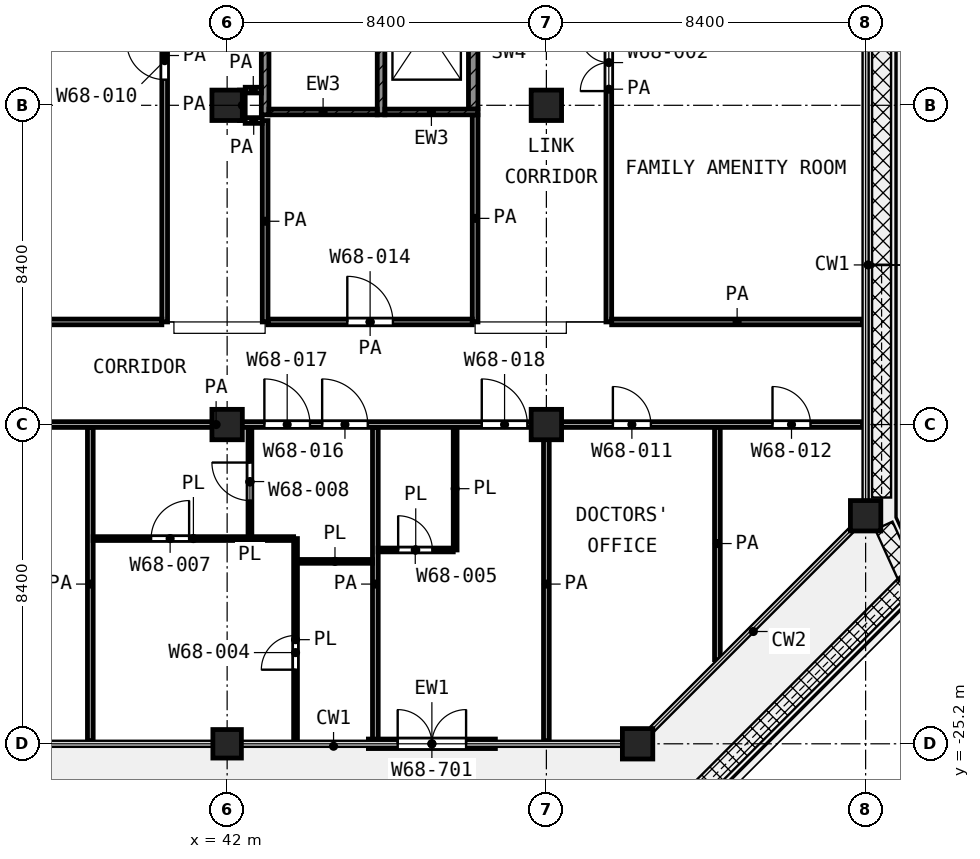
"""IFC4 building model, lengths in metres.
Left out: names, types, materials, properties, quantities, classifications, styles, units other than length and angle.
Written with IfcOpenShell. Run it as: python <this file> out.ifc"""

import sys

from ifc_helpers import new_model, si_unit, direction, frame, frame_2d, origin, origin_2d, place, context, subcontext, project, spatial, rectangle, extrude, element, fill, save


model = new_model("IFC4")
c1 = context("Model", 3, precision=1e-05, world=origin(), true_north=direction((0.0, 1.0)))
c2 = subcontext(c1, "Body", "Model", "MODEL_VIEW")
j1 = project(units=[si_unit("LENGTHUNIT", "METRE"), si_unit("PLANEANGLEUNIT", "RADIAN")], contexts=[c1])
p1 = place(None, origin())
s1 = spatial("IfcSite", under=j1, at=p1, CompositionType="ELEMENT")
p2 = place(p1, origin())
s2 = spatial("IfcBuilding", under=s1, at=p2, CompositionType="ELEMENT")
p3 = place(p2, frame((0.0, 0.0, 315.4)))
s3 = spatial("IfcBuildingStorey", under=s2, at=p3, CompositionType="ELEMENT", Elevation=315.4)
for number, where, z_axis, x_axis in (
    (1, (42.0, -8.4, 0.0), (0.0, 0.0, 1.0), (1.0, 0.0, 0.0)),
    (2, (50.4, -8.4, 0.0), (0.0, 0.0, 1.0), (1.0, 0.0, 0.0)),
    (3, (42.0, -16.8, 0.0), (0.0, 0.0, 1.0), (1.0, 0.0, 0.0)),
    (4, (50.4, -16.8, 0.0), (0.0, 0.0, 1.0), (1.0, 0.0, 0.0)),
    (5, (58.8, -19.2, 0.0), (0.0, 0.0, 1.0), (1.0, 0.0, 0.0)),
):
    element("IfcColumn", number, at=place(p3, frame(where, z_axis=z_axis, x_axis=x_axis)), inside=s3, PredefinedType="COLUMN", context=c2, shape_type="SweptSolid", body=[
        extrude(rectangle(XDim=0.8, YDim=0.8, at=origin_2d()), origin(), (0.0, 0.0, 1.0), 4.2),
    ])
p4 = place(p3, frame((42.0, -25.2, 0.0), z_axis=(0.0, 0.0, 1.0), x_axis=(1.0, 0.0, 0.0)))
e6 = element("IfcColumn", 6, at=p4, inside=s3, PredefinedType="COLUMN", context=c2, shape_type="SweptSolid", body=[
    extrude(rectangle(XDim=0.75, YDim=0.75, at=origin_2d()), origin(), (0.0, 0.0, 1.0), 4.2),
])
p5 = place(p3, frame((52.8, -25.2, 0.0), z_axis=(0.0, 0.0, 1.0), x_axis=(1.0, 0.0, 0.0)))
e7 = element("IfcColumn", 7, at=p5, inside=s3, PredefinedType="COLUMN", context=c2, shape_type="SweptSolid", body=[
    extrude(rectangle(XDim=0.8, YDim=0.8, at=origin_2d()), origin(), (0.0, 0.0, 1.0), 4.2),
])
p6 = place(p3, frame((45.717, -25.2, 0.0), z_axis=(0.0, 0.0, 1.0), x_axis=(1.0, 0.0, 0.0)))
e8 = element("IfcWall", 8, at=p6, inside=s3, PredefinedType="SOLIDWALL", context=c2, shape_type="SweptSolid", body=[
    extrude(rectangle(XDim=3.342, YDim=0.25, at=frame_2d((1.671, 0.0))), origin(), (0.0, 0.0, 1.0), 3.48),
])
p7 = place(p6, frame((0.771, 0.0, 0.0)))
e9 = element("IfcOpeningElement", 9, at=p7, cuts=e8, PredefinedType="OPENING", context=c2, shape_type="SweptSolid", body=[
    extrude(rectangle(XDim=1.8, YDim=2.1, at=frame_2d((0.9, 1.05))), frame((0.0, 0.135, 0.0), z_axis=(0.0, -1.0, 0.0), x_axis=(1.0, 0.0, 0.0)), (0.0, 0.0, 1.0), 0.27),
])
p8 = place(p3, frame((43.0, -8.65, 0.0), z_axis=(0.0, 0.0, 1.0), x_axis=(0.0, 1.0, 0.0)))
e10 = element("IfcWall", 10, at=p8, inside=s3, PredefinedType="SHEAR", context=c2, shape_type="SweptSolid", body=[
    extrude(rectangle(XDim=8.35, YDim=0.2, at=frame_2d((4.175, 0.0))), origin(), (0.0, 0.0, 1.0), 3.6),
])
p9 = place(p8, frame((7.0, 0.0, 0.0)))
e11 = element("IfcOpeningElement", 11, at=p9, cuts=e10, PredefinedType="OPENING", context=c2, shape_type="SweptSolid", body=[
    extrude(rectangle(XDim=1.1, YDim=2.1, at=frame_2d((0.55, 1.05))), frame((0.0, 0.11, 0.0), z_axis=(0.0, -1.0, 0.0), x_axis=(1.0, 0.0, 0.0)), (0.0, 0.0, 1.0), 0.22),
])
p10 = place(p3, frame((46.05, -8.65, 0.0), z_axis=(0.0, 0.0, 1.0), x_axis=(0.0, 1.0, 0.0)))
e12 = element("IfcWall", 12, at=p10, inside=s3, PredefinedType="SHEAR", context=c2, shape_type="SweptSolid", body=[
    extrude(rectangle(XDim=8.35, YDim=0.2, at=frame_2d((4.175, 0.0))), origin(), (0.0, 0.0, 1.0), 3.6),
])
p11 = place(p10, frame((7.0, 0.0, 0.0)))
e13 = element("IfcOpeningElement", 13, at=p11, cuts=e12, PredefinedType="OPENING", context=c2, shape_type="SweptSolid", body=[
    extrude(rectangle(XDim=1.1, YDim=2.1, at=frame_2d((0.55, 1.05))), frame((0.0, 0.11, 0.0), z_axis=(0.0, -1.0, 0.0), x_axis=(1.0, 0.0, 0.0)), (0.0, 0.0, 1.0), 0.22),
])
p12 = place(p3, frame((43.1, -8.575, 0.0), z_axis=(0.0, 0.0, 1.0), x_axis=(1.0, 0.0, 0.0)))
e14 = element("IfcWall", 14, at=p12, inside=s3, PredefinedType="SHEAR", context=c2, shape_type="SweptSolid", body=[
    extrude(rectangle(XDim=2.85, YDim=0.15, at=frame_2d((1.425, 0.0))), origin(), (0.0, 0.0, 1.0), 3.6),
])
p13 = place(p3, frame((46.15, -8.575, 0.0), z_axis=(0.0, 0.0, 1.0), x_axis=(1.0, 0.0, 0.0)))
e15 = element("IfcWall", 15, at=p13, inside=s3, PredefinedType="SHEAR", context=c2, shape_type="SweptSolid", body=[
    extrude(rectangle(XDim=2.45, YDim=0.15, at=frame_2d((1.225, 0.0))), origin(), (0.0, 0.0, 1.0), 3.6),
])
p14 = place(p3, frame((48.475, -8.5, 0.0), z_axis=(0.0, 0.0, 1.0), x_axis=(0.0, 1.0, 0.0)))
e16 = element("IfcWall", 16, at=p14, inside=s3, PredefinedType="SHEAR", context=c2, shape_type="SweptSolid", body=[
    extrude(rectangle(XDim=3.475, YDim=0.25, at=frame_2d((1.738, 0.0))), origin(), (0.0, 0.0, 1.0), 3.6),
])
p15 = place(p3, frame((43.85, -20.4, 0.0), z_axis=(0.0, 0.0, 1.0), x_axis=(1.0, 0.0, 0.0)))
e17 = element("IfcWall", 17, at=p15, inside=s3, PredefinedType="PARTITIONING", context=c2, shape_type="SweptSolid", body=[
    extrude(rectangle(XDim=1.975, YDim=0.1, at=frame_2d((0.987, 0.0))), origin(), (0.0, 0.0, 1.0), 3.6),
])
p16 = place(p3, frame((45.975, -20.1, 0.0), z_axis=(0.0, 0.0, 1.0), x_axis=(1.0, 0.0, 0.0)))
e18 = element("IfcWall", 18, at=p16, inside=s3, PredefinedType="PARTITIONING", context=c2, shape_type="SweptSolid", body=[
    extrude(rectangle(XDim=1.975, YDim=0.1, at=frame_2d((0.987, 0.0))), origin(), (0.0, 0.0, 1.0), 3.6),
])
p17 = place(p16, frame((0.525, 0.0, 0.0)))
e19 = element("IfcOpeningElement", 19, at=p17, cuts=e18, PredefinedType="OPENING", context=c2, shape_type="SweptSolid", body=[
    extrude(rectangle(XDim=0.9, YDim=2.1, at=frame_2d((0.45, 1.05))), frame((0.0, 0.06, 0.0), z_axis=(0.0, -1.0, 0.0), x_axis=(1.0, 0.0, 0.0)), (0.0, 0.0, 1.0), 0.12),
])
p18 = place(p3, frame((38.475, -19.8, 0.0), z_axis=(0.0, 0.0, 1.0), x_axis=(1.0, 0.0, 0.0)))
e20 = element("IfcWall", 20, at=p18, inside=s3, PredefinedType="PARTITIONING", context=c2, shape_type="SweptSolid", body=[
    extrude(rectangle(XDim=5.275, YDim=0.1, at=frame_2d((2.637, 0.0))), origin(), (0.0, 0.0, 1.0), 3.6),
])
p19 = place(p18, frame((1.525, 0.0, 0.0)))
e21 = element("IfcOpeningElement", 21, at=p19, cuts=e20, PredefinedType="OPENING", context=c2, shape_type="SweptSolid", body=[
    extrude(rectangle(XDim=1.0, YDim=2.1, at=frame_2d((0.5, 1.05))), frame((0.0, 0.06, 0.0), z_axis=(0.0, -1.0, 0.0), x_axis=(1.0, 0.0, 0.0)), (0.0, 0.0, 1.0), 0.12),
])
p20 = place(p3, frame((42.6, -19.75, 0.0), z_axis=(0.0, 0.0, 1.0), x_axis=(0.0, 1.0, 0.0)))
e22 = element("IfcWall", 22, at=p20, inside=s3, PredefinedType="PARTITIONING", context=c2, shape_type="SweptSolid", body=[
    extrude(rectangle(XDim=2.875, YDim=0.1, at=frame_2d((1.438, 0.0))), origin(), (0.0, 0.0, 1.0), 3.6),
])
p21 = place(p20, frame((0.95, 0.0, 0.0)))
e23 = element("IfcOpeningElement", 23, at=p21, cuts=e22, PredefinedType="OPENING", context=c2, shape_type="SweptSolid", body=[
    extrude(rectangle(XDim=1.0, YDim=2.1, at=frame_2d((0.5, 1.05))), frame((0.0, 0.06, 0.0), z_axis=(0.0, -1.0, 0.0), x_axis=(1.0, 0.0, 0.0)), (0.0, 0.0, 1.0), 0.12),
])
p22 = place(p3, frame((43.8, -25.12, 0.0), z_axis=(0.0, 0.0, 1.0), x_axis=(0.0, 1.0, 0.0)))
e24 = element("IfcWall", 24, at=p22, inside=s3, PredefinedType="PARTITIONING", context=c2, shape_type="SweptSolid", body=[
    extrude(rectangle(XDim=5.32, YDim=0.1, at=frame_2d((2.66, 0.0))), origin(), (0.0, 0.0, 1.0), 3.6),
])
p23 = place(p22, frame((1.87, 0.0, 0.0)))
e25 = element("IfcOpeningElement", 25, at=p23, cuts=e24, PredefinedType="OPENING", context=c2, shape_type="SweptSolid", body=[
    extrude(rectangle(XDim=0.9, YDim=2.1, at=frame_2d((0.45, 1.05))), frame((0.0, 0.06, 0.0), z_axis=(0.0, -1.0, 0.0), x_axis=(1.0, 0.0, 0.0)), (0.0, 0.0, 1.0), 0.12),
])
p24 = place(p3, frame((48.0, -20.1, 0.0), z_axis=(0.0, 0.0, 1.0), x_axis=(0.0, 1.0, 0.0)))
e26 = element("IfcWall", 26, at=p24, inside=s3, PredefinedType="PARTITIONING", context=c2, shape_type="SweptSolid", body=[
    extrude(rectangle(XDim=3.225, YDim=0.1, at=frame_2d((1.613, 0.0))), origin(), (0.0, 0.0, 1.0), 3.6),
])
p25 = place(p3, frame((24.7, -16.8, 0.0), z_axis=(0.0, 0.0, 1.0), x_axis=(1.0, 0.0, 0.0)))
e27 = element("IfcWall", 27, at=p25, inside=s3, PredefinedType="PARTITIONING", context=c2, shape_type="SweptSolid", body=[
    extrude(rectangle(XDim=34.02, YDim=0.15, at=frame_2d((17.01, 0.0))), origin(), (0.0, 0.0, 1.0), 3.6),
])
p26 = place(p25, frame((1.85, 0.0, 0.0)))
e28 = element("IfcOpeningElement", 28, at=p26, cuts=e27, PredefinedType="OPENING", context=c2, shape_type="SweptSolid", body=[
    extrude(rectangle(XDim=1.5, YDim=2.1, at=frame_2d((0.75, 1.05))), frame((0.0, 0.085, 0.0), z_axis=(0.0, -1.0, 0.0), x_axis=(1.0, 0.0, 0.0)), (0.0, 0.0, 1.0), 0.17),
])
p27 = place(p25, frame((9.4, 0.0, 0.0)))
e29 = element("IfcOpeningElement", 29, at=p27, cuts=e27, PredefinedType="OPENING", context=c2, shape_type="SweptSolid", body=[
    extrude(rectangle(XDim=1.2, YDim=2.1, at=frame_2d((0.6, 1.05))), frame((0.0, 0.085, 0.0), z_axis=(0.0, -1.0, 0.0), x_axis=(1.0, 0.0, 0.0)), (0.0, 0.0, 1.0), 0.17),
])
p28 = place(p25, frame((19.8, 0.0, 0.0)))
e30 = element("IfcOpeningElement", 30, at=p28, cuts=e27, PredefinedType="OPENING", context=c2, shape_type="SweptSolid", body=[
    extrude(rectangle(XDim=1.2, YDim=2.1, at=frame_2d((0.6, 1.05))), frame((0.0, 0.085, 0.0), z_axis=(0.0, -1.0, 0.0), x_axis=(1.0, 0.0, 0.0)), (0.0, 0.0, 1.0), 0.17),
])
p29 = place(p25, frame((18.28, 0.0, 0.0)))
e31 = element("IfcOpeningElement", 31, at=p29, cuts=e27, PredefinedType="OPENING", context=c2, shape_type="SweptSolid", body=[
    extrude(rectangle(XDim=1.2, YDim=2.1, at=frame_2d((0.6, 1.05))), frame((0.0, 0.085, 0.0), z_axis=(0.0, -1.0, 0.0), x_axis=(1.0, 0.0, 0.0)), (0.0, 0.0, 1.0), 0.17),
])
p30 = place(p25, frame((24.0, 0.0, 0.0)))
e32 = element("IfcOpeningElement", 32, at=p30, cuts=e27, PredefinedType="OPENING", context=c2, shape_type="SweptSolid", body=[
    extrude(rectangle(XDim=1.2, YDim=2.1, at=frame_2d((0.6, 1.05))), frame((0.0, 0.085, 0.0), z_axis=(0.0, -1.0, 0.0), x_axis=(1.0, 0.0, 0.0)), (0.0, 0.0, 1.0), 0.17),
])
p31 = place(p25, frame((27.45, 0.0, 0.0)))
e33 = element("IfcOpeningElement", 33, at=p31, cuts=e27, PredefinedType="OPENING", context=c2, shape_type="SweptSolid", body=[
    extrude(rectangle(XDim=1.0, YDim=2.1, at=frame_2d((0.5, 1.05))), frame((0.0, 0.085, 0.0), z_axis=(0.0, -1.0, 0.0), x_axis=(1.0, 0.0, 0.0)), (0.0, 0.0, 1.0), 0.17),
])
p32 = place(p25, frame((31.65, 0.0, 0.0)))
e34 = element("IfcOpeningElement", 34, at=p32, cuts=e27, PredefinedType="OPENING", context=c2, shape_type="SweptSolid", body=[
    extrude(rectangle(XDim=1.0, YDim=2.1, at=frame_2d((0.5, 1.05))), frame((0.0, 0.085, 0.0), z_axis=(0.0, -1.0, 0.0), x_axis=(1.0, 0.0, 0.0)), (0.0, 0.0, 1.0), 0.17),
])
p33 = place(p3, frame((29.475, -14.1, 0.0), z_axis=(0.0, 0.0, 1.0), x_axis=(1.0, 0.0, 0.0)))
e35 = element("IfcWall", 35, at=p33, inside=s3, PredefinedType="PARTITIONING", context=c2, shape_type="SweptSolid", body=[
    extrude(rectangle(XDim=10.807, YDim=0.15, at=frame_2d((5.403, 0.0))), origin(), (0.0, 0.0, 1.0), 3.6),
])
p34 = place(p33, frame((1.425, 0.0, 0.0)))
e36 = element("IfcOpeningElement", 36, at=p34, cuts=e35, PredefinedType="OPENING", context=c2, shape_type="SweptSolid", body=[
    extrude(rectangle(XDim=1.2, YDim=2.1, at=frame_2d((0.6, 1.05))), frame((0.0, 0.085, 0.0), z_axis=(0.0, -1.0, 0.0), x_axis=(1.0, 0.0, 0.0)), (0.0, 0.0, 1.0), 0.17),
])
p35 = place(p3, frame((43.075, -14.1, 0.0), z_axis=(0.0, 0.0, 1.0), x_axis=(1.0, 0.0, 0.0)))
e37 = element("IfcWall", 37, at=p35, inside=s3, PredefinedType="PARTITIONING", context=c2, shape_type="SweptSolid", body=[
    extrude(rectangle(XDim=5.375, YDim=0.15, at=frame_2d((2.688, 0.0))), origin(), (0.0, 0.0, 1.0), 3.6),
])
p36 = place(p35, frame((2.087, 0.0, 0.0)))
e38 = element("IfcOpeningElement", 38, at=p36, cuts=e37, PredefinedType="OPENING", context=c2, shape_type="SweptSolid", body=[
    extrude(rectangle(XDim=1.2, YDim=2.1, at=frame_2d((0.6, 1.05))), frame((0.0, 0.085, 0.0), z_axis=(0.0, -1.0, 0.0), x_axis=(1.0, 0.0, 0.0)), (0.0, 0.0, 1.0), 0.17),
])
p37 = place(p3, frame((52.118, -14.1, 0.0), z_axis=(0.0, 0.0, 1.0), x_axis=(1.0, 0.0, 0.0)))
e39 = element("IfcWall", 39, at=p37, inside=s3, PredefinedType="PARTITIONING", context=c2, shape_type="SweptSolid", body=[
    extrude(rectangle(XDim=6.602, YDim=0.15, at=frame_2d((3.301, 0.0))), origin(), (0.0, 0.0, 1.0), 3.6),
])
p38 = place(p3, frame((42.475, -8.8, 0.0), z_axis=(0.0, 0.0, 1.0), x_axis=(1.0, 0.0, 0.0)))
e40 = element("IfcWall", 40, at=p38, inside=s3, PredefinedType="PARTITIONING", context=c2, shape_type="SweptSolid", body=[
    extrude(rectangle(XDim=0.448, YDim=0.15, at=frame_2d((0.224, 0.0))), origin(), (0.0, 0.0, 1.0), 3.6),
])
p39 = place(p3, frame((42.476, -8.0, 0.0), z_axis=(0.0, 0.0, 1.0), x_axis=(1.0, 0.0, 0.0)))
e41 = element("IfcWall", 41, at=p39, inside=s3, PredefinedType="PARTITIONING", context=c2, shape_type="SweptSolid", body=[
    extrude(rectangle(XDim=0.424, YDim=0.15, at=frame_2d((0.212, 0.0))), origin(), (0.0, 0.0, 1.0), 3.6),
])
p40 = place(p3, frame((38.4, -25.12, 0.0), z_axis=(0.0, 0.0, 1.0), x_axis=(0.0, 1.0, 0.0)))
e42 = element("IfcWall", 42, at=p40, inside=s3, PredefinedType="PARTITIONING", context=c2, shape_type="SweptSolid", body=[
    extrude(rectangle(XDim=8.245, YDim=0.15, at=frame_2d((4.123, 0.0))), origin(), (0.0, 0.0, 1.0), 3.6),
])
p41 = place(p3, frame((40.357, -14.1, 0.0), z_axis=(0.0, 0.0, 1.0), x_axis=(0.0, 1.0, 0.0)))
e43 = element("IfcWall", 43, at=p41, inside=s3, PredefinedType="PARTITIONING", context=c2, shape_type="SweptSolid", body=[
    extrude(rectangle(XDim=14.02, YDim=0.15, at=frame_2d((7.01, 0.0))), origin(), (0.0, 0.0, 1.0), 3.6),
])
p42 = place(p41, frame((6.375, 0.0, 0.0)))
e44 = element("IfcOpeningElement", 44, at=p42, cuts=e43, PredefinedType="OPENING", context=c2, shape_type="SweptSolid", body=[
    extrude(rectangle(XDim=1.0, YDim=2.1, at=frame_2d((0.5, 1.05))), frame((0.0, 0.085, 0.0), z_axis=(0.0, -1.0, 0.0), x_axis=(1.0, 0.0, 0.0)), (0.0, 0.0, 1.0), 0.17),
])
p43 = place(p3, frame((42.4, -8.8, 0.0), z_axis=(0.0, 0.0, 1.0), x_axis=(0.0, 1.0, 0.0)))
e45 = element("IfcWall", 45, at=p43, inside=s3, PredefinedType="PARTITIONING", context=c2, shape_type="SweptSolid", body=[
    extrude(rectangle(XDim=0.799, YDim=0.15, at=frame_2d((0.399, 0.0))), origin(), (0.0, 0.0, 1.0), 3.6),
])
p44 = place(p3, frame((43.0, -14.1, 0.0), z_axis=(0.0, 0.0, 1.0), x_axis=(0.0, 1.0, 0.0)))
e46 = element("IfcWall", 46, at=p44, inside=s3, PredefinedType="PARTITIONING", context=c2, shape_type="SweptSolid", body=[
    extrude(rectangle(XDim=5.298, YDim=0.15, at=frame_2d((2.649, 0.0))), origin(), (0.0, 0.0, 1.0), 3.6),
])
p45 = place(p3, frame((45.9, -25.12, 0.0), z_axis=(0.0, 0.0, 1.0), x_axis=(0.0, 1.0, 0.0)))
e47 = element("IfcWall", 47, at=p45, inside=s3, PredefinedType="PARTITIONING", context=c2, shape_type="SweptSolid", body=[
    extrude(rectangle(XDim=8.245, YDim=0.15, at=frame_2d((4.123, 0.0))), origin(), (0.0, 0.0, 1.0), 3.6),
])
p46 = place(p3, frame((48.525, -14.1, 0.0), z_axis=(0.0, 0.0, 1.0), x_axis=(0.0, 1.0, 0.0)))
e48 = element("IfcWall", 48, at=p46, inside=s3, PredefinedType="PARTITIONING", context=c2, shape_type="SweptSolid", body=[
    extrude(rectangle(XDim=5.45, YDim=0.15, at=frame_2d((2.725, 0.0))), origin(), (0.0, 0.0, 1.0), 3.6),
])
p47 = place(p3, frame((50.4, -25.12, 0.0), z_axis=(0.0, 0.0, 1.0), x_axis=(0.0, 1.0, 0.0)))
e49 = element("IfcWall", 49, at=p47, inside=s3, PredefinedType="PARTITIONING", context=c2, shape_type="SweptSolid", body=[
    extrude(rectangle(XDim=8.245, YDim=0.15, at=frame_2d((4.123, 0.0))), origin(), (0.0, 0.0, 1.0), 3.6),
])
p48 = place(p3, frame((52.043, -14.1, 0.0), z_axis=(0.0, 0.0, 1.0), x_axis=(0.0, 1.0, 0.0)))
e50 = element("IfcWall", 50, at=p48, inside=s3, PredefinedType="PARTITIONING", context=c2, shape_type="SweptSolid", body=[
    extrude(rectangle(XDim=12.248, YDim=0.15, at=frame_2d((6.124, 0.0))), origin(), (0.0, 0.0, 1.0), 3.6),
])
p49 = place(p48, frame((6.074, 0.0, 0.0)))
e51 = element("IfcOpeningElement", 51, at=p49, cuts=e50, PredefinedType="OPENING", context=c2, shape_type="SweptSolid", body=[
    extrude(rectangle(XDim=1.5, YDim=2.1, at=frame_2d((0.75, 1.05))), frame((0.0, 0.085, 0.0), z_axis=(0.0, -1.0, 0.0), x_axis=(1.0, 0.0, 0.0)), (0.0, 0.0, 1.0), 0.17),
])
p50 = place(p3, frame((54.9, -22.987, 0.0), z_axis=(0.0, 0.0, 1.0), x_axis=(0.0, 1.0, 0.0)))
e52 = element("IfcWall", 52, at=p50, inside=s3, PredefinedType="PARTITIONING", context=c2, shape_type="SweptSolid", body=[
    extrude(rectangle(XDim=6.112, YDim=0.15, at=frame_2d((3.056, 0.0))), origin(), (0.0, 0.0, 1.0), 3.6),
])
p51 = place(p7, origin())
e53 = element("IfcDoor", 53, at=p51, inside=s3, OperationType="DOUBLE_DOOR_SINGLE_SWING", PredefinedType="DOOR", context=c2, shape_type="SweptSolid", body=[
    extrude(rectangle(XDim=1.8, YDim=2.1, at=frame_2d((0.9, 1.05))), frame((0.0, 0.025, 0.0), z_axis=(0.0, -1.0, 0.0), x_axis=(1.0, 0.0, 0.0)), (0.0, 0.0, 1.0), 0.05),
])
fill(e9, e53)
p52 = place(p42, origin())
e54 = element("IfcDoor", 54, at=p52, inside=s3, OperationType="SINGLE_SWING_RIGHT", PredefinedType="DOOR", context=c2, shape_type="SweptSolid", body=[
    extrude(rectangle(XDim=1.0, YDim=2.1, at=frame_2d((0.5, 1.05))), frame((0.0, 0.025, 0.0), z_axis=(0.0, -1.0, 0.0), x_axis=(1.0, 0.0, 0.0)), (0.0, 0.0, 1.0), 0.05),
])
fill(e44, e54)
p53 = place(p36, origin())
e55 = element("IfcDoor", 55, at=p53, inside=s3, OperationType="SINGLE_SWING_LEFT", PredefinedType="DOOR", context=c2, shape_type="SweptSolid", body=[
    extrude(rectangle(XDim=1.2, YDim=2.1, at=frame_2d((0.6, 1.05))), frame((0.0, 0.025, 0.0), z_axis=(0.0, -1.0, 0.0), x_axis=(1.0, 0.0, 0.0)), (0.0, 0.0, 1.0), 0.05),
])
fill(e38, e55)
p54 = place(p49, origin())
e56 = element("IfcDoor", 56, at=p54, inside=s3, OperationType="DOUBLE_DOOR_SINGLE_SWING", PredefinedType="DOOR", context=c2, shape_type="SweptSolid", body=[
    extrude(rectangle(XDim=1.5, YDim=2.1, at=frame_2d((0.75, 1.05))), frame((0.0, 0.025, 0.0), z_axis=(0.0, -1.0, 0.0), x_axis=(1.0, 0.0, 0.0)), (0.0, 0.0, 1.0), 0.05),
])
fill(e51, e56)
p55 = place(p28, origin())
e57 = element("IfcDoor", 57, at=p55, inside=s3, OperationType="SINGLE_SWING_LEFT", PredefinedType="DOOR", context=c2, shape_type="SweptSolid", body=[
    extrude(rectangle(XDim=1.2, YDim=2.1, at=frame_2d((0.6, 1.05))), frame((0.0, 0.025, 0.0), z_axis=(0.0, -1.0, 0.0), x_axis=(1.0, 0.0, 0.0)), (0.0, 0.0, 1.0), 0.05),
])
fill(e30, e57)
p56 = place(p29, origin())
e58 = element("IfcDoor", 58, at=p56, inside=s3, OperationType="SINGLE_SWING_LEFT", PredefinedType="DOOR", context=c2, shape_type="SweptSolid", body=[
    extrude(rectangle(XDim=1.2, YDim=2.1, at=frame_2d((0.6, 1.05))), frame((0.0, 0.025, 0.0), z_axis=(0.0, -1.0, 0.0), x_axis=(1.0, 0.0, 0.0)), (0.0, 0.0, 1.0), 0.05),
])
fill(e31, e58)
p57 = place(p19, origin())
e59 = element("IfcDoor", 59, at=p57, inside=s3, OperationType="SINGLE_SWING_RIGHT", PredefinedType="DOOR", context=c2, shape_type="SweptSolid", body=[
    extrude(rectangle(XDim=1.0, YDim=2.1, at=frame_2d((0.5, 1.05))), frame((0.0, 0.025, 0.0), z_axis=(0.0, -1.0, 0.0), x_axis=(1.0, 0.0, 0.0)), (0.0, 0.0, 1.0), 0.05),
])
fill(e21, e59)
p58 = place(p21, origin())
e60 = element("IfcDoor", 60, at=p58, inside=s3, OperationType="SINGLE_SWING_RIGHT", PredefinedType="DOOR", context=c2, shape_type="SweptSolid", body=[
    extrude(rectangle(XDim=1.0, YDim=2.1, at=frame_2d((0.5, 1.05))), frame((0.0, 0.025, 0.0), z_axis=(0.0, -1.0, 0.0), x_axis=(1.0, 0.0, 0.0)), (0.0, 0.0, 1.0), 0.05),
])
fill(e23, e60)
p59 = place(p23, origin())
e61 = element("IfcDoor", 61, at=p59, inside=s3, OperationType="SINGLE_SWING_LEFT", PredefinedType="DOOR", context=c2, shape_type="SweptSolid", body=[
    extrude(rectangle(XDim=0.9, YDim=2.1, at=frame_2d((0.45, 1.05))), frame((0.0, 0.025, 0.0), z_axis=(0.0, -1.0, 0.0), x_axis=(1.0, 0.0, 0.0)), (0.0, 0.0, 1.0), 0.05),
])
fill(e25, e61)
p60 = place(p30, origin())
e62 = element("IfcDoor", 62, at=p60, inside=s3, OperationType="SINGLE_SWING_LEFT", PredefinedType="DOOR", context=c2, shape_type="SweptSolid", body=[
    extrude(rectangle(XDim=1.2, YDim=2.1, at=frame_2d((0.6, 1.05))), frame((0.0, 0.025, 0.0), z_axis=(0.0, -1.0, 0.0), x_axis=(1.0, 0.0, 0.0)), (0.0, 0.0, 1.0), 0.05),
])
fill(e32, e62)
p61 = place(p17, origin())
e63 = element("IfcDoor", 63, at=p61, inside=s3, OperationType="SINGLE_SWING_LEFT", PredefinedType="DOOR", context=c2, shape_type="SweptSolid", body=[
    extrude(rectangle(XDim=0.9, YDim=2.1, at=frame_2d((0.45, 1.05))), frame((0.0, 0.025, 0.0), z_axis=(0.0, -1.0, 0.0), x_axis=(1.0, 0.0, 0.0)), (0.0, 0.0, 1.0), 0.05),
])
fill(e19, e63)
p62 = place(p31, origin())
e64 = element("IfcDoor", 64, at=p62, inside=s3, OperationType="SINGLE_SWING_LEFT", PredefinedType="DOOR", context=c2, shape_type="SweptSolid", body=[
    extrude(rectangle(XDim=1.0, YDim=2.1, at=frame_2d((0.5, 1.05))), frame((0.0, 0.025, 0.0), z_axis=(0.0, -1.0, 0.0), x_axis=(1.0, 0.0, 0.0)), (0.0, 0.0, 1.0), 0.05),
])
fill(e33, e64)
p63 = place(p32, origin())
e65 = element("IfcDoor", 65, at=p63, inside=s3, OperationType="SINGLE_SWING_LEFT", PredefinedType="DOOR", context=c2, shape_type="SweptSolid", body=[
    extrude(rectangle(XDim=1.0, YDim=2.1, at=frame_2d((0.5, 1.05))), frame((0.0, 0.025, 0.0), z_axis=(0.0, -1.0, 0.0), x_axis=(1.0, 0.0, 0.0)), (0.0, 0.0, 1.0), 0.05),
])
fill(e34, e65)
save(model, sys.argv[1])
